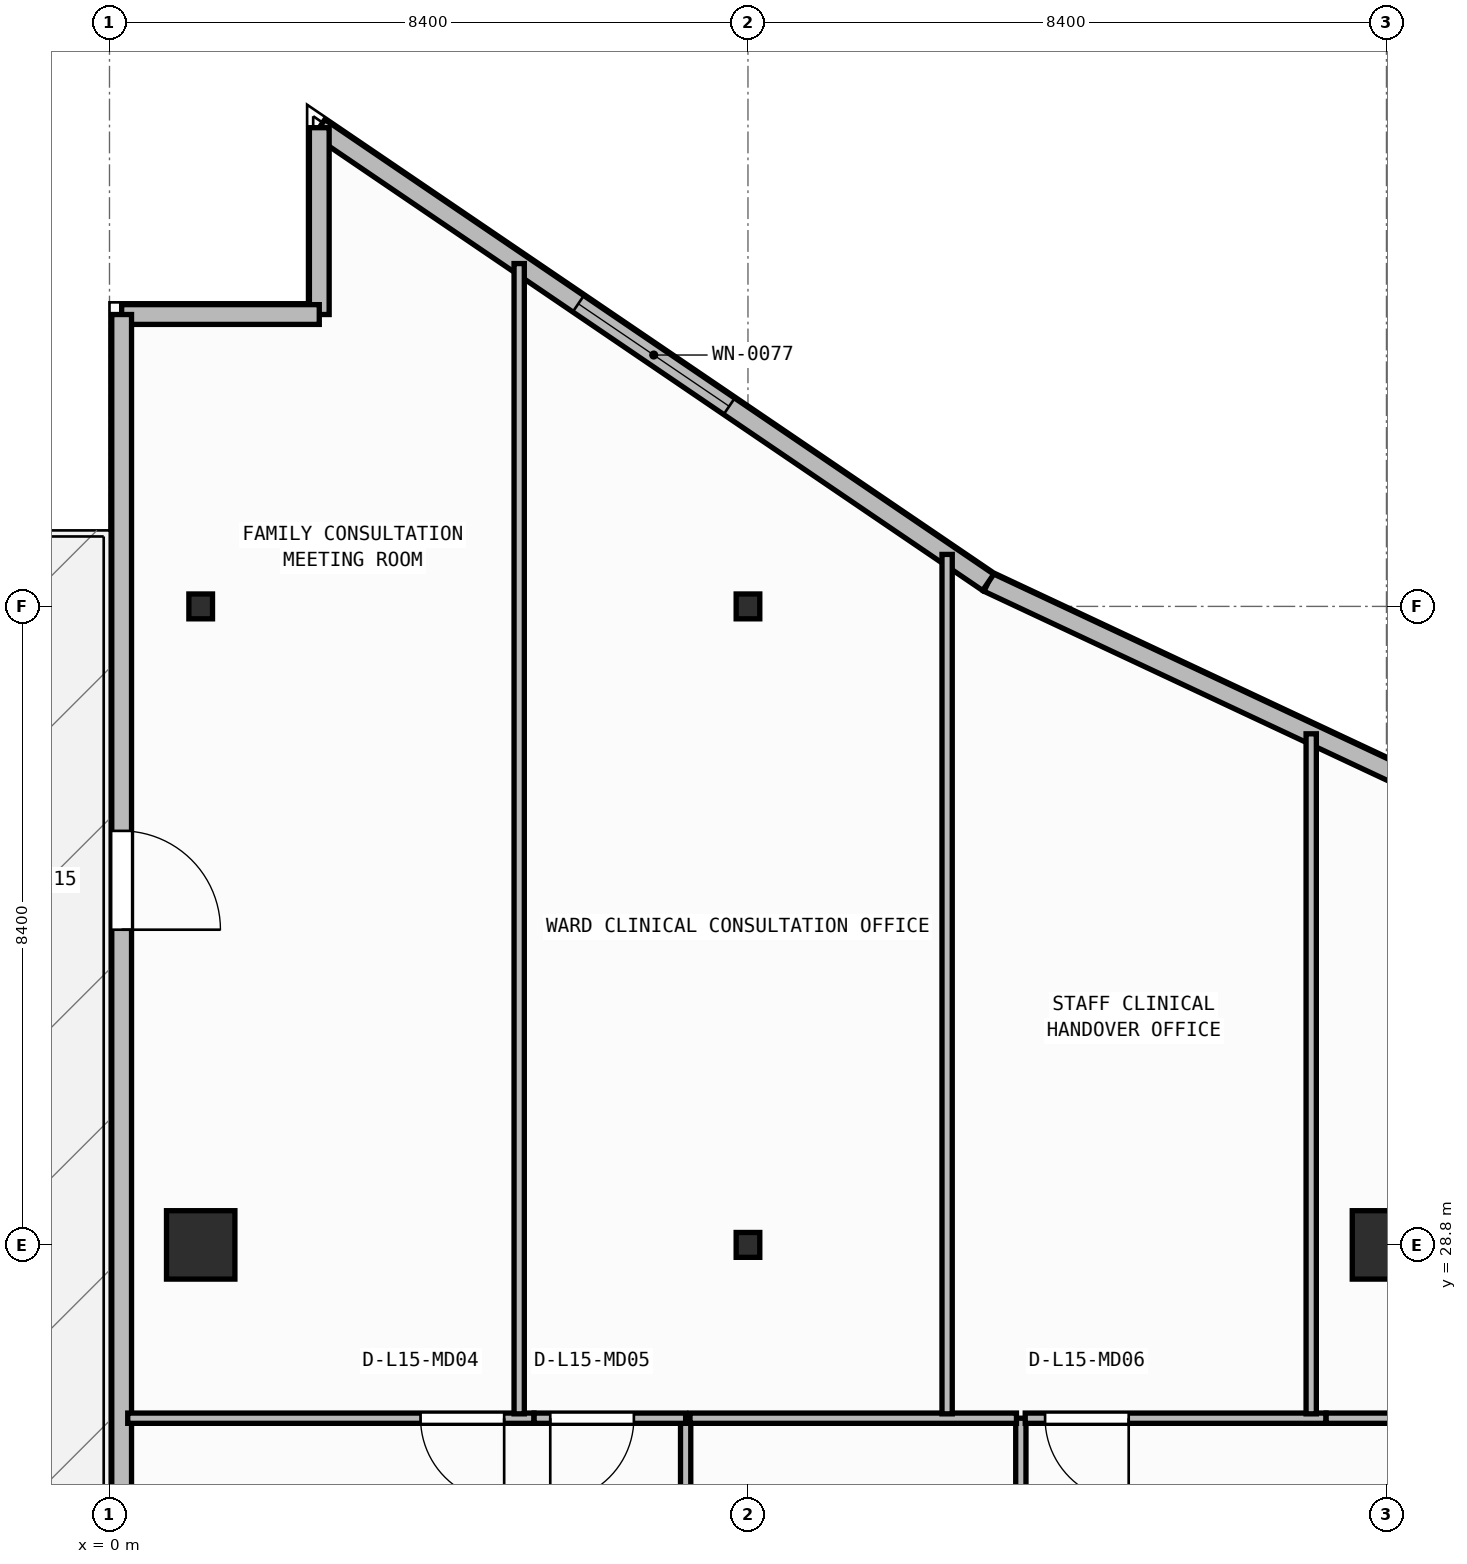
"""IFC4 building model, lengths in metres.
Left out: names, types, materials, properties, quantities, classifications, styles, units other than length and angle.
Written with IfcOpenShell. Run it as: python <this file> out.ifc"""

import sys

from ifc_helpers import new_model, si_unit, direction, frame, frame_2d, origin, origin_2d, place, context, subcontext, project, spatial, rectangle, i_section, extrude, element, fill, save


model = new_model("IFC4")
c1 = context("Model", 3, precision=1e-05, world=origin(), true_north=direction((0.0, 1.0)))
c2 = subcontext(c1, "Body", "Model", "MODEL_VIEW")
j1 = project(units=[si_unit("LENGTHUNIT", "METRE"), si_unit("PLANEANGLEUNIT", "RADIAN")], contexts=[c1])
p1 = place(None, origin())
s1 = spatial("IfcSite", under=j1, at=p1, CompositionType="ELEMENT")
p2 = place(p1, origin())
s2 = spatial("IfcBuilding", under=s1, at=p2, CompositionType="ELEMENT")
p3 = place(p2, frame((0.0, 0.0, 62.0)))
s3 = spatial("IfcBuildingStorey", under=s2, at=p3, CompositionType="ELEMENT", Elevation=62.0)
p4 = place(p3, frame((1.2, 28.8, 0.0), z_axis=(0.0, 0.0, 1.0), x_axis=(1.0, 0.0, 0.0)))
e1 = element("IfcColumn", 1, at=p4, inside=s3, PredefinedType="COLUMN", context=c2, shape_type="SweptSolid", body=[
    extrude(rectangle(XDim=0.9, YDim=0.9, at=origin_2d()), origin(), (0.0, 0.0, 1.0), 3.95),
])
p5 = place(p3, frame((8.4, 28.8, 0.0), z_axis=(0.0, 0.0, 1.0), x_axis=(1.0, 0.0, 0.0)))
e2 = element("IfcColumn", 2, at=p5, inside=s3, PredefinedType="COLUMN", context=c2, shape_type="SweptSolid", body=[
    extrude(i_section(OverallWidth=0.311, OverallDepth=0.327, WebThickness=0.016, FlangeThickness=0.025, FilletRadius=0.017, at=origin_2d()), origin(), (0.0, 0.0, 1.0), 3.95),
])
p6 = place(p3, frame((16.8, 28.8, 0.0), z_axis=(0.0, 0.0, 1.0), x_axis=(1.0, 0.0, 0.0)))
e3 = element("IfcColumn", 3, at=p6, inside=s3, PredefinedType="COLUMN", context=c2, shape_type="SweptSolid", body=[
    extrude(rectangle(XDim=0.9, YDim=0.9, at=origin_2d()), origin(), (0.0, 0.0, 1.0), 3.95),
])
for number, where, z_axis, x_axis in (
    (4, (1.2, 37.2, 0.0), (0.0, 0.0, 1.0), (1.0, 0.0, 0.0)),
    (5, (8.4, 37.2, 0.0), (0.0, 0.0, 1.0), (1.0, 0.0, 0.0)),
):
    element("IfcColumn", number, at=place(p3, frame(where, z_axis=z_axis, x_axis=x_axis)), inside=s3, PredefinedType="COLUMN", context=c2, shape_type="SweptSolid", body=[
        extrude(i_section(OverallWidth=0.311, OverallDepth=0.327, WebThickness=0.016, FlangeThickness=0.025, FilletRadius=0.017, at=origin_2d()), origin(), (0.0, 0.0, 1.0), 3.95),
    ])
p7 = place(p3, frame((24.408, 31.492, 0.0), z_axis=(0.0, 0.0, 1.0), x_axis=(-0.905396522918, 0.424566998585, 0.0)))
e6 = element("IfcWall", 6, at=p7, inside=s3, PredefinedType="STANDARD", context=c2, shape_type="SweptSolid", body=[
    extrude(rectangle(XDim=14.189, YDim=0.26, at=frame_2d((7.095, 0.0))), origin(), (0.0, 0.0, 1.0), 3.71),
])
p8 = place(p7, frame((5.895, 0.0, 0.9)))
e7 = element("IfcOpeningElement", 7, at=p8, cuts=e6, PredefinedType="OPENING", context=c2, shape_type="SweptSolid", body=[
    extrude(rectangle(XDim=2.4, YDim=1.65, at=frame_2d((1.2, 0.825))), frame((0.0, 0.14, 0.0), z_axis=(0.0, -1.0, 0.0), x_axis=(1.0, 0.0, 0.0)), (0.0, 0.0, 1.0), 0.28),
])
p9 = place(p3, frame((11.561, 37.517, 0.0), z_axis=(0.0, 0.0, 1.0), x_axis=(-0.827064743936, 0.562106670782, 0.0)))
e8 = element("IfcWall", 8, at=p9, inside=s3, PredefinedType="STANDARD", context=c2, shape_type="SweptSolid", body=[
    extrude(rectangle(XDim=10.641, YDim=0.26, at=frame_2d((5.32, 0.0))), origin(), (0.0, 0.0, 1.0), 3.71),
])
p10 = place(p9, frame((4.12, 0.0, 0.9)))
e9 = element("IfcOpeningElement", 9, at=p10, cuts=e8, PredefinedType="OPENING", context=c2, shape_type="SweptSolid", body=[
    extrude(rectangle(XDim=2.4, YDim=1.65, at=frame_2d((1.2, 0.825))), frame((0.0, 0.14, 0.0), z_axis=(0.0, -1.0, 0.0), x_axis=(1.0, 0.0, 0.0)), (0.0, 0.0, 1.0), 0.28),
])
p11 = place(p3, frame((2.76, 43.498, 0.0), z_axis=(0.0, 0.0, 1.0), x_axis=(0.0, -1.0, 0.0)))
e10 = element("IfcWall", 10, at=p11, inside=s3, PredefinedType="STANDARD", context=c2, shape_type="SweptSolid", body=[
    extrude(rectangle(XDim=2.458, YDim=0.26, at=frame_2d((1.229, 0.0))), origin(), (0.0, 0.0, 1.0), 3.71),
])
p12 = place(p3, frame((2.76, 41.04, 0.0), z_axis=(0.0, 0.0, 1.0), x_axis=(-1.0, 0.0, 0.0)))
e11 = element("IfcWall", 11, at=p12, inside=s3, PredefinedType="STANDARD", context=c2, shape_type="SweptSolid", body=[
    extrude(rectangle(XDim=2.6, YDim=0.26, at=frame_2d((1.3, 0.0))), origin(), (0.0, 0.0, 1.0), 3.71),
])
p13 = place(p3, frame((0.16, 41.04, 0.0), z_axis=(0.0, 0.0, 1.0), x_axis=(0.0, -1.0, 0.0)))
e12 = element("IfcWall", 12, at=p13, inside=s3, PredefinedType="STANDARD", context=c2, shape_type="SweptSolid", body=[
    extrude(rectangle(XDim=38.28, YDim=0.26, at=frame_2d((19.14, 0.0))), origin(), (0.0, 0.0, 1.0), 3.71),
])
p14 = place(p13, frame((6.793, 0.0, 0.0)))
e13 = element("IfcOpeningElement", 13, at=p14, cuts=e12, PredefinedType="OPENING", context=c2, shape_type="SweptSolid", body=[
    extrude(rectangle(XDim=1.3, YDim=2.15, at=frame_2d((0.65, 1.075))), frame((0.0, 0.14, 0.0), z_axis=(0.0, -1.0, 0.0), x_axis=(1.0, 0.0, 0.0)), (0.0, 0.0, 1.0), 0.28),
])
p15 = place(p3, frame((7.58, 14.76, 0.0), z_axis=(0.0, 0.0, 1.0), x_axis=(0.0, 1.0, 0.0)))
e14 = element("IfcWall", 14, at=p15, inside=s3, PredefinedType="PARTITIONING", context=c2, shape_type="SweptSolid", body=[
    extrude(rectangle(XDim=11.76, YDim=0.135, at=frame_2d((5.88, 0.0))), origin(), (0.0, 0.0, 1.0), 3.71),
])
p16 = place(p3, frame((5.585, 26.52, 0.0), z_axis=(0.0, 0.0, 1.0), x_axis=(-1.0, 0.0, 0.0)))
e15 = element("IfcWall", 15, at=p16, inside=s3, PredefinedType="PARTITIONING", context=c2, shape_type="SweptSolid", body=[
    extrude(rectangle(XDim=5.345, YDim=0.135, at=frame_2d((2.672, 0.0))), origin(), (0.0, 0.0, 1.0), 3.71),
])
p17 = place(p16, frame((0.392, 0.0, 0.0)))
e16 = element("IfcOpeningElement", 16, at=p17, cuts=e15, PredefinedType="OPENING", context=c2, shape_type="SweptSolid", body=[
    extrude(rectangle(XDim=1.1, YDim=2.1, at=frame_2d((0.55, 1.05))), frame((0.0, 0.077, 0.0), z_axis=(0.0, -1.0, 0.0), x_axis=(1.0, 0.0, 0.0)), (0.0, 0.0, 1.0), 0.155),
])
p18 = place(p3, frame((7.58, 26.52, 0.0), z_axis=(0.0, 0.0, 1.0), x_axis=(-1.0, 0.0, 0.0)))
e17 = element("IfcWall", 17, at=p18, inside=s3, PredefinedType="PARTITIONING", context=c2, shape_type="SweptSolid", body=[
    extrude(rectangle(XDim=1.993, YDim=0.135, at=frame_2d((0.997, 0.0))), origin(), (0.0, 0.0, 1.0), 3.71),
])
p19 = place(p18, frame((0.681, 0.0, 0.0)))
e18 = element("IfcOpeningElement", 18, at=p19, cuts=e17, PredefinedType="OPENING", context=c2, shape_type="SweptSolid", body=[
    extrude(rectangle(XDim=1.1, YDim=2.1, at=frame_2d((0.55, 1.05))), frame((0.0, 0.077, 0.0), z_axis=(0.0, -1.0, 0.0), x_axis=(1.0, 0.0, 0.0)), (0.0, 0.0, 1.0), 0.155),
])
p20 = place(p3, frame((11.99, 14.76, 0.0), z_axis=(0.0, 0.0, 1.0), x_axis=(0.0, 1.0, 0.0)))
e19 = element("IfcWall", 19, at=p20, inside=s3, PredefinedType="PARTITIONING", context=c2, shape_type="SweptSolid", body=[
    extrude(rectangle(XDim=11.76, YDim=0.135, at=frame_2d((5.88, 0.0))), origin(), (0.0, 0.0, 1.0), 3.71),
])
p21 = place(p3, frame((11.933, 26.52, 0.0), z_axis=(0.0, 0.0, 1.0), x_axis=(-1.0, 0.0, 0.0)))
e20 = element("IfcWall", 20, at=p21, inside=s3, PredefinedType="PARTITIONING", context=c2, shape_type="SweptSolid", body=[
    extrude(rectangle(XDim=4.295, YDim=0.135, at=frame_2d((2.147, 0.0))), origin(), (0.0, 0.0, 1.0), 3.71),
])
p22 = place(p3, frame((16.005, 26.52, 0.0), z_axis=(0.0, 0.0, 1.0), x_axis=(-1.0, 0.0, 0.0)))
e21 = element("IfcWall", 21, at=p22, inside=s3, PredefinedType="PARTITIONING", context=c2, shape_type="SweptSolid", body=[
    extrude(rectangle(XDim=3.957, YDim=0.135, at=frame_2d((1.979, 0.0))), origin(), (0.0, 0.0, 1.0), 3.71),
])
p23 = place(p22, frame((2.596, 0.0, 0.0)))
e22 = element("IfcOpeningElement", 22, at=p23, cuts=e21, PredefinedType="OPENING", context=c2, shape_type="SweptSolid", body=[
    extrude(rectangle(XDim=1.1, YDim=2.1, at=frame_2d((0.55, 1.05))), frame((0.0, 0.077, 0.0), z_axis=(0.0, -1.0, 0.0), x_axis=(1.0, 0.0, 0.0)), (0.0, 0.0, 1.0), 0.155),
])
p24 = place(p3, frame((21.215, 26.52, 0.0), z_axis=(0.0, 0.0, 1.0), x_axis=(-1.0, 0.0, 0.0)))
e23 = element("IfcWall", 23, at=p24, inside=s3, PredefinedType="PARTITIONING", context=c2, shape_type="SweptSolid", body=[
    extrude(rectangle(XDim=5.208, YDim=0.135, at=frame_2d((2.604, 0.0))), origin(), (0.0, 0.0, 1.0), 3.71),
])
p25 = place(p24, frame((0.385, 0.0, 0.0)))
e24 = element("IfcOpeningElement", 24, at=p25, cuts=e23, PredefinedType="OPENING", context=c2, shape_type="SweptSolid", body=[
    extrude(rectangle(XDim=1.1, YDim=2.1, at=frame_2d((0.55, 1.05))), frame((0.0, 0.077, 0.0), z_axis=(0.0, -1.0, 0.0), x_axis=(1.0, 0.0, 0.0)), (0.0, 0.0, 1.0), 0.155),
])
p26 = place(p3, frame((5.39, 26.577, 0.0), z_axis=(0.0, 0.0, 1.0), x_axis=(0.0, 1.0, 0.0)))
e25 = element("IfcWall", 25, at=p26, inside=s3, PredefinedType="PARTITIONING", context=c2, shape_type="SweptSolid", body=[
    extrude(rectangle(XDim=15.133, YDim=0.135, at=frame_2d((7.566, 0.0))), origin(), (0.0, 0.0, 1.0), 3.71),
])
p27 = place(p3, frame((11.02, 26.577, 0.0), z_axis=(0.0, 0.0, 1.0), x_axis=(0.0, 1.0, 0.0)))
e26 = element("IfcWall", 26, at=p27, inside=s3, PredefinedType="PARTITIONING", context=c2, shape_type="SweptSolid", body=[
    extrude(rectangle(XDim=11.306, YDim=0.135, at=frame_2d((5.653, 0.0))), origin(), (0.0, 0.0, 1.0), 3.71),
])
p28 = place(p3, frame((15.81, 26.577, 0.0), z_axis=(0.0, 0.0, 1.0), x_axis=(0.0, 1.0, 0.0)))
e27 = element("IfcWall", 27, at=p28, inside=s3, PredefinedType="PARTITIONING", context=c2, shape_type="SweptSolid", body=[
    extrude(rectangle(XDim=8.947, YDim=0.135, at=frame_2d((4.473, 0.0))), origin(), (0.0, 0.0, 1.0), 3.71),
])
p29 = place(p10, origin())
e28 = element("IfcWindow", 28, at=p29, inside=s3, PartitioningType="SINGLE_PANEL", PredefinedType="WINDOW", context=c2, shape_type="SweptSolid", body=[
    extrude(rectangle(XDim=2.4, YDim=1.65, at=frame_2d((1.2, 0.825))), frame((0.0, 0.03, 0.0), z_axis=(0.0, -1.0, 0.0), x_axis=(1.0, 0.0, 0.0)), (0.0, 0.0, 1.0), 0.06),
])
fill(e9, e28)
p30 = place(p14, origin())
e29 = element("IfcDoor", 29, at=p30, inside=s3, OperationType="SINGLE_SWING_RIGHT", PredefinedType="DOOR", context=c2, shape_type="SweptSolid", body=[
    extrude(rectangle(XDim=1.3, YDim=2.15, at=frame_2d((0.65, 1.075))), frame((0.0, 0.025, 0.0), z_axis=(0.0, -1.0, 0.0), x_axis=(1.0, 0.0, 0.0)), (0.0, 0.0, 1.0), 0.05),
])
fill(e13, e29)
p31 = place(p17, origin())
e30 = element("IfcDoor", 30, at=p31, inside=s3, OperationType="SINGLE_SWING_LEFT", PredefinedType="DOOR", context=c2, shape_type="SweptSolid", body=[
    extrude(rectangle(XDim=1.1, YDim=2.1, at=frame_2d((0.55, 1.05))), frame((0.0, 0.025, 0.0), z_axis=(0.0, -1.0, 0.0), x_axis=(1.0, 0.0, 0.0)), (0.0, 0.0, 1.0), 0.05),
])
fill(e16, e30)
p32 = place(p19, origin())
e31 = element("IfcDoor", 31, at=p32, inside=s3, OperationType="SINGLE_SWING_RIGHT", PredefinedType="DOOR", context=c2, shape_type="SweptSolid", body=[
    extrude(rectangle(XDim=1.1, YDim=2.1, at=frame_2d((0.55, 1.05))), frame((0.0, 0.025, 0.0), z_axis=(0.0, -1.0, 0.0), x_axis=(1.0, 0.0, 0.0)), (0.0, 0.0, 1.0), 0.05),
])
fill(e18, e31)
p33 = place(p23, origin())
e32 = element("IfcDoor", 32, at=p33, inside=s3, OperationType="SINGLE_SWING_LEFT", PredefinedType="DOOR", context=c2, shape_type="SweptSolid", body=[
    extrude(rectangle(XDim=1.1, YDim=2.1, at=frame_2d((0.55, 1.05))), frame((0.0, 0.025, 0.0), z_axis=(0.0, -1.0, 0.0), x_axis=(1.0, 0.0, 0.0)), (0.0, 0.0, 1.0), 0.05),
])
fill(e22, e32)
save(model, sys.argv[1])
